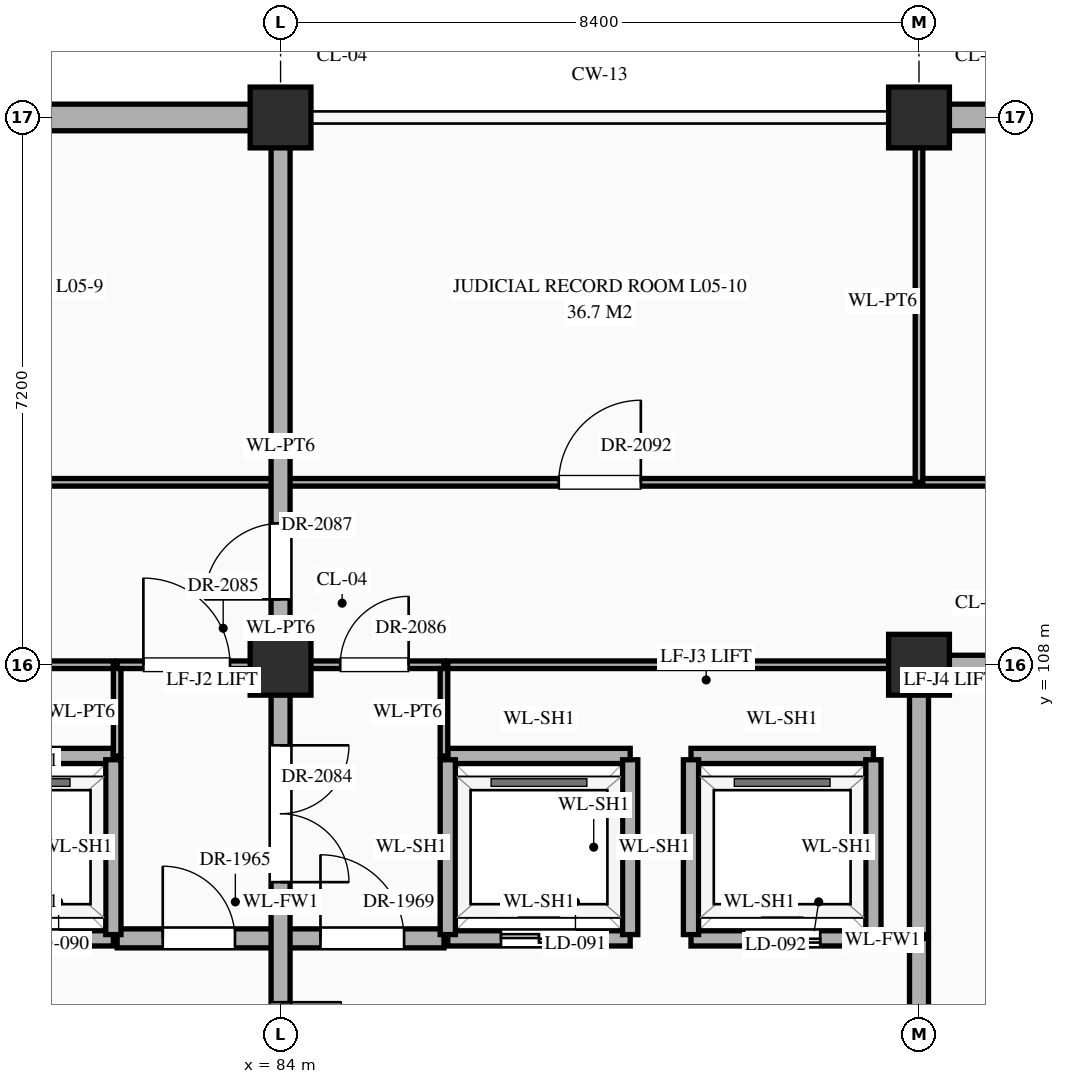
"""IFC4 building model, lengths in metres.
Left out: names, types, materials, properties, quantities, classifications, styles, units other than length and angle.
Written with IfcOpenShell. Run it as: python <this file> out.ifc"""

import sys

from ifc_helpers import new_model, si_unit, direction, frame, frame_2d, origin, origin_2d, place, context, subcontext, project, spatial, rectangle, extrude, element, fill, save


model = new_model("IFC4")
c1 = context("Model", 3, precision=1e-05, world=origin(), true_north=direction((0.0, 1.0)))
c2 = subcontext(c1, "Body", "Model", "MODEL_VIEW")
j1 = project(units=[si_unit("LENGTHUNIT", "METRE"), si_unit("PLANEANGLEUNIT", "RADIAN")], contexts=[c1])
p1 = place(None, origin())
s1 = spatial("IfcSite", under=j1, at=p1, CompositionType="ELEMENT")
p2 = place(p1, origin())
s2 = spatial("IfcBuilding", under=s1, at=p2, CompositionType="ELEMENT")
p3 = place(p2, frame((0.0, 0.0, 21.6)))
s3 = spatial("IfcBuildingStorey", under=s2, at=p3, CompositionType="ELEMENT", Elevation=21.6)
for number, where, z_axis, x_axis in (
    (1, (84.0, 108.0, 0.0), (0.0, 0.0, 1.0), (1.0, 0.0, 0.0)),
    (2, (84.0, 115.2, 0.0), (0.0, 0.0, 1.0), (1.0, 0.0, 0.0)),
    (3, (92.4, 108.0, 0.0), (0.0, 0.0, 1.0), (1.0, 0.0, 0.0)),
    (4, (92.4, 115.2, 0.0), (0.0, 0.0, 1.0), (1.0, 0.0, 0.0)),
):
    element("IfcColumn", number, at=place(p3, frame(where, z_axis=z_axis, x_axis=x_axis)), inside=s3, PredefinedType="COLUMN", context=c2, shape_type="SweptSolid", body=[
        extrude(rectangle(XDim=0.8, YDim=0.8, at=origin_2d()), origin(), (0.0, 0.0, 1.0), 4.5),
    ])
p4 = place(p3, frame((75.995, 115.2, 0.0), z_axis=(0.0, 0.0, 1.0), x_axis=(1.0, 0.0, 0.0)))
e5 = element("IfcWall", 5, at=p4, inside=s3, PredefinedType="STANDARD", context=c2, shape_type="SweptSolid", body=[
    extrude(rectangle(XDim=7.61, YDim=0.35, at=frame_2d((3.805, 0.0))), origin(), (0.0, 0.0, 1.0), 3.59),
])
p5 = place(p4, frame((3.355, 0.0, 0.85)))
e6 = element("IfcOpeningElement", 6, at=p5, cuts=e5, PredefinedType="OPENING", context=c2, shape_type="SweptSolid", body=[
    extrude(rectangle(XDim=0.9, YDim=2.12, at=frame_2d((0.45, 1.06))), frame((0.0, 0.187, 0.0), z_axis=(0.0, -1.0, 0.0), x_axis=(1.0, 0.0, 0.0)), (0.0, 0.0, 1.0), 0.374),
])
p6 = place(p3, frame((92.795, 115.2, 0.0), z_axis=(0.0, 0.0, 1.0), x_axis=(1.0, 0.0, 0.0)))
e7 = element("IfcWall", 7, at=p6, inside=s3, PredefinedType="STANDARD", context=c2, shape_type="SweptSolid", body=[
    extrude(rectangle(XDim=7.61, YDim=0.35, at=frame_2d((3.805, 0.0))), origin(), (0.0, 0.0, 1.0), 3.59),
])
p7 = place(p6, frame((3.28, 0.0, 0.85)))
e8 = element("IfcOpeningElement", 8, at=p7, cuts=e7, PredefinedType="OPENING", context=c2, shape_type="SweptSolid", body=[
    extrude(rectangle(XDim=1.05, YDim=1.38, at=frame_2d((0.525, 0.69))), frame((0.0, 0.187, 0.0), z_axis=(0.0, -1.0, 0.0), x_axis=(1.0, 0.0, 0.0)), (0.0, 0.0, 1.0), 0.374),
])
p8 = place(p3, frame((79.4, 104.4, 0.0), z_axis=(0.0, 0.0, 1.0), x_axis=(1.0, 0.0, 0.0)))
e9 = element("IfcWall", 9, at=p8, inside=s3, PredefinedType="STANDARD", context=c2, shape_type="SweptSolid", body=[
    extrude(rectangle(XDim=2.4, YDim=0.2, at=frame_2d((1.2, 0.0))), origin(), (0.0, 0.0, 1.0), 4.24),
])
p9 = place(p8, frame((0.7, 0.0, 0.0)))
e10 = element("IfcOpeningElement", 10, at=p9, cuts=e9, PredefinedType="OPENING", context=c2, shape_type="SweptSolid", body=[
    extrude(rectangle(XDim=1.0, YDim=2.15, at=frame_2d((0.5, 1.075))), frame((0.0, 0.112, 0.0), z_axis=(0.0, -1.0, 0.0), x_axis=(1.0, 0.0, 0.0)), (0.0, 0.0, 1.0), 0.224),
])
p10 = place(p3, frame((81.85, 104.4, 0.0), z_axis=(0.0, 0.0, 1.0), x_axis=(1.0, 0.0, 0.0)))
e11 = element("IfcWall", 11, at=p10, inside=s3, PredefinedType="STANDARD", context=c2, shape_type="SweptSolid", body=[
    extrude(rectangle(XDim=4.3, YDim=0.25, at=frame_2d((2.15, 0.0))), origin(), (0.0, 0.0, 1.0), 4.24),
])
p11 = place(p10, frame((0.6, 0.0, 0.0)))
e12 = element("IfcOpeningElement", 12, at=p11, cuts=e11, PredefinedType="OPENING", context=c2, shape_type="SweptSolid", body=[
    extrude(rectangle(XDim=0.95, YDim=2.15, at=frame_2d((0.475, 1.075))), frame((0.0, 0.137, 0.0), z_axis=(0.0, -1.0, 0.0), x_axis=(1.0, 0.0, 0.0)), (0.0, 0.0, 1.0), 0.274),
])
p12 = place(p10, frame((2.675, 0.0, 0.0)))
e13 = element("IfcOpeningElement", 13, at=p12, cuts=e11, PredefinedType="OPENING", context=c2, shape_type="SweptSolid", body=[
    extrude(rectangle(XDim=1.1, YDim=2.2, at=frame_2d((0.55, 1.1))), frame((0.0, 0.137, 0.0), z_axis=(0.0, -1.0, 0.0), x_axis=(1.0, 0.0, 0.0)), (0.0, 0.0, 1.0), 0.274),
])
p13 = place(p3, frame((86.2, 104.4, 0.0), z_axis=(0.0, 0.0, 1.0), x_axis=(1.0, 0.0, 0.0)))
e14 = element("IfcWall", 14, at=p13, inside=s3, PredefinedType="STANDARD", context=c2, shape_type="SweptSolid", body=[
    extrude(rectangle(XDim=2.4, YDim=0.2, at=frame_2d((1.2, 0.0))), origin(), (0.0, 0.0, 1.0), 4.24),
])
p14 = place(p13, frame((0.7, 0.0, 0.0)))
e15 = element("IfcOpeningElement", 15, at=p14, cuts=e14, PredefinedType="OPENING", context=c2, shape_type="SweptSolid", body=[
    extrude(rectangle(XDim=1.0, YDim=2.15, at=frame_2d((0.5, 1.075))), frame((0.0, 0.112, 0.0), z_axis=(0.0, -1.0, 0.0), x_axis=(1.0, 0.0, 0.0)), (0.0, 0.0, 1.0), 0.224),
])
p15 = place(p3, frame((89.4, 104.4, 0.0), z_axis=(0.0, 0.0, 1.0), x_axis=(1.0, 0.0, 0.0)))
e16 = element("IfcWall", 16, at=p15, inside=s3, PredefinedType="STANDARD", context=c2, shape_type="SweptSolid", body=[
    extrude(rectangle(XDim=2.4, YDim=0.2, at=frame_2d((1.2, 0.0))), origin(), (0.0, 0.0, 1.0), 4.24),
])
p16 = place(p15, frame((0.7, 0.0, 0.0)))
e17 = element("IfcOpeningElement", 17, at=p16, cuts=e16, PredefinedType="OPENING", context=c2, shape_type="SweptSolid", body=[
    extrude(rectangle(XDim=1.0, YDim=2.15, at=frame_2d((0.5, 1.075))), frame((0.0, 0.112, 0.0), z_axis=(0.0, -1.0, 0.0), x_axis=(1.0, 0.0, 0.0)), (0.0, 0.0, 1.0), 0.224),
])
for number, where, z_axis, x_axis in (
    (18, (79.4, 106.8, 0.0), (0.0, 0.0, 1.0), (1.0, 0.0, 0.0)),
    (19, (86.2, 106.8, 0.0), (0.0, 0.0, 1.0), (1.0, 0.0, 0.0)),
    (20, (89.4, 106.8, 0.0), (0.0, 0.0, 1.0), (1.0, 0.0, 0.0)),
):
    element("IfcWall", number, at=place(p3, frame(where, z_axis=z_axis, x_axis=x_axis)), inside=s3, PredefinedType="STANDARD", context=c2, shape_type="SweptSolid", body=[
        extrude(rectangle(XDim=2.4, YDim=0.2, at=frame_2d((1.2, 0.0))), origin(), (0.0, 0.0, 1.0), 4.24),
    ])
p17 = place(p3, frame((75.65, 108.0, 0.0), z_axis=(0.0, 0.0, 1.0), x_axis=(1.0, 0.0, 0.0)))
e21 = element("IfcWall", 21, at=p17, inside=s3, PredefinedType="STANDARD", context=c2, shape_type="SweptSolid", body=[
    extrude(rectangle(XDim=6.15, YDim=0.1, at=frame_2d((3.075, 0.0))), origin(), (0.0, 0.0, 1.0), 3.39),
])
p18 = place(p3, frame((81.85, 108.0, 0.0), z_axis=(0.0, 0.0, 1.0), x_axis=(1.0, 0.0, 0.0)))
e22 = element("IfcWall", 22, at=p18, inside=s3, PredefinedType="STANDARD", context=c2, shape_type="SweptSolid", body=[
    extrude(rectangle(XDim=4.3, YDim=0.1, at=frame_2d((2.15, 0.0))), origin(), (0.0, 0.0, 1.0), 3.39),
])
p19 = place(p18, frame((0.345, 0.0, 0.0)))
e23 = element("IfcOpeningElement", 23, at=p19, cuts=e22, PredefinedType="OPENING", context=c2, shape_type="SweptSolid", body=[
    extrude(rectangle(XDim=1.14, YDim=2.4, at=frame_2d((0.57, 1.2))), frame((0.0, 0.062, 0.0), z_axis=(0.0, -1.0, 0.0), x_axis=(1.0, 0.0, 0.0)), (0.0, 0.0, 1.0), 0.124),
])
p20 = place(p18, frame((2.935, 0.0, 0.0)))
e24 = element("IfcOpeningElement", 24, at=p20, cuts=e22, PredefinedType="OPENING", context=c2, shape_type="SweptSolid", body=[
    extrude(rectangle(XDim=0.9, YDim=2.15, at=frame_2d((0.45, 1.075))), frame((0.0, 0.062, 0.0), z_axis=(0.0, -1.0, 0.0), x_axis=(1.0, 0.0, 0.0)), (0.0, 0.0, 1.0), 0.124),
])
p21 = place(p3, frame((86.2, 108.0, 0.0), z_axis=(0.0, 0.0, 1.0), x_axis=(1.0, 0.0, 0.0)))
e25 = element("IfcWall", 25, at=p21, inside=s3, PredefinedType="STANDARD", context=c2, shape_type="SweptSolid", body=[
    extrude(rectangle(XDim=6.15, YDim=0.1, at=frame_2d((3.075, 0.0))), origin(), (0.0, 0.0, 1.0), 3.39),
])
p22 = place(p3, frame((92.4, 108.0, 0.0), z_axis=(0.0, 0.0, 1.0), x_axis=(1.0, 0.0, 0.0)))
e26 = element("IfcWall", 26, at=p22, inside=s3, PredefinedType="STANDARD", context=c2, shape_type="SweptSolid", body=[
    extrude(rectangle(XDim=4.2, YDim=0.25, at=frame_2d((2.1, 0.0))), origin(), (0.0, 0.0, 1.0), 3.39),
])
p23 = place(p22, frame((1.76, 0.0, 0.0)))
e27 = element("IfcOpeningElement", 27, at=p23, cuts=e26, PredefinedType="OPENING", context=c2, shape_type="SweptSolid", body=[
    extrude(rectangle(XDim=1.0, YDim=2.2, at=frame_2d((0.5, 1.1))), frame((0.0, 0.137, 0.0), z_axis=(0.0, -1.0, 0.0), x_axis=(1.0, 0.0, 0.0)), (0.0, 0.0, 1.0), 0.274),
])
p24 = place(p3, frame((67.2, 110.4, 0.0), z_axis=(0.0, 0.0, 1.0), x_axis=(1.0, 0.0, 0.0)))
e28 = element("IfcWall", 28, at=p24, inside=s3, PredefinedType="STANDARD", context=c2, shape_type="SweptSolid", body=[
    extrude(rectangle(XDim=33.6, YDim=0.1, at=frame_2d((16.8, 0.0))), origin(), (0.0, 0.0, 1.0), 4.24),
])
p25 = place(p24, frame((3.7, 0.0, 0.0)))
e29 = element("IfcOpeningElement", 29, at=p25, cuts=e28, PredefinedType="OPENING", context=c2, shape_type="SweptSolid", body=[
    extrude(rectangle(XDim=1.0, YDim=2.25, at=frame_2d((0.5, 1.125))), frame((0.0, 0.062, 0.0), z_axis=(0.0, -1.0, 0.0), x_axis=(1.0, 0.0, 0.0)), (0.0, 0.0, 1.0), 0.124),
])
p26 = place(p24, frame((12.08, 0.0, 0.0)))
e30 = element("IfcOpeningElement", 30, at=p26, cuts=e28, PredefinedType="OPENING", context=c2, shape_type="SweptSolid", body=[
    extrude(rectangle(XDim=1.04, YDim=2.2, at=frame_2d((0.52, 1.1))), frame((0.0, 0.062, 0.0), z_axis=(0.0, -1.0, 0.0), x_axis=(1.0, 0.0, 0.0)), (0.0, 0.0, 1.0), 0.124),
])
p27 = place(p24, frame((20.46, 0.0, 0.0)))
e31 = element("IfcOpeningElement", 31, at=p27, cuts=e28, PredefinedType="OPENING", context=c2, shape_type="SweptSolid", body=[
    extrude(rectangle(XDim=1.08, YDim=2.25, at=frame_2d((0.54, 1.125))), frame((0.0, 0.062, 0.0), z_axis=(0.0, -1.0, 0.0), x_axis=(1.0, 0.0, 0.0)), (0.0, 0.0, 1.0), 0.124),
])
p28 = place(p24, frame((28.84, 0.0, 0.0)))
e32 = element("IfcOpeningElement", 32, at=p28, cuts=e28, PredefinedType="OPENING", context=c2, shape_type="SweptSolid", body=[
    extrude(rectangle(XDim=1.12, YDim=2.25, at=frame_2d((0.56, 1.125))), frame((0.0, 0.062, 0.0), z_axis=(0.0, -1.0, 0.0), x_axis=(1.0, 0.0, 0.0)), (0.0, 0.0, 1.0), 0.124),
])
p29 = place(p3, frame((81.8, 104.45, 0.0), z_axis=(0.0, 0.0, 1.0), x_axis=(0.0, 1.0, 0.0)))
e33 = element("IfcWall", 33, at=p29, inside=s3, PredefinedType="STANDARD", context=c2, shape_type="SweptSolid", body=[
    extrude(rectangle(XDim=2.3, YDim=0.2, at=frame_2d((1.15, 0.0))), origin(), (0.0, 0.0, 1.0), 4.24),
])
p30 = place(p3, frame((81.85, 106.8, 0.0), z_axis=(0.0, 0.0, 1.0), x_axis=(0.0, 1.0, 0.0)))
e34 = element("IfcWall", 34, at=p30, inside=s3, PredefinedType="STANDARD", context=c2, shape_type="SweptSolid", body=[
    extrude(rectangle(XDim=1.15, YDim=0.1, at=frame_2d((0.575, 0.0))), origin(), (0.0, 0.0, 1.0), 4.24),
])
p31 = place(p3, frame((84.0, 79.24, 0.0), z_axis=(0.0, 0.0, 1.0), x_axis=(0.0, 1.0, 0.0)))
e35 = element("IfcWall", 35, at=p31, inside=s3, PredefinedType="STANDARD", context=c2, shape_type="SweptSolid", body=[
    extrude(rectangle(XDim=35.92, YDim=0.25, at=frame_2d((17.96, 0.0))), origin(), (0.0, 0.0, 1.0), 3.49),
])
p32 = place(p31, frame((22.72, 0.0, 0.0)))
e36 = element("IfcOpeningElement", 36, at=p32, cuts=e35, PredefinedType="OPENING", context=c2, shape_type="SweptSolid", body=[
    extrude(rectangle(XDim=1.6, YDim=2.3, at=frame_2d((0.8, 1.15))), frame((0.0, 0.137, 0.0), z_axis=(0.0, -1.0, 0.0), x_axis=(1.0, 0.0, 0.0)), (0.0, 0.0, 1.0), 0.274),
])
p33 = place(p31, frame((12.45, 0.0, 0.0)))
e37 = element("IfcOpeningElement", 37, at=p33, cuts=e35, PredefinedType="OPENING", context=c2, shape_type="SweptSolid", body=[
    extrude(rectangle(XDim=1.1, YDim=2.2, at=frame_2d((0.55, 1.1))), frame((0.0, 0.137, 0.0), z_axis=(0.0, -1.0, 0.0), x_axis=(1.0, 0.0, 0.0)), (0.0, 0.0, 1.0), 0.274),
])
p34 = place(p31, frame((15.245, 0.0, 0.0)))
e38 = element("IfcOpeningElement", 38, at=p34, cuts=e35, PredefinedType="OPENING", context=c2, shape_type="SweptSolid", body=[
    extrude(rectangle(XDim=0.95, YDim=2.15, at=frame_2d((0.475, 1.075))), frame((0.0, 0.137, 0.0), z_axis=(0.0, -1.0, 0.0), x_axis=(1.0, 0.0, 0.0)), (0.0, 0.0, 1.0), 0.274),
])
p35 = place(p31, frame((25.9, 0.0, 0.0)))
e39 = element("IfcOpeningElement", 39, at=p35, cuts=e35, PredefinedType="OPENING", context=c2, shape_type="SweptSolid", body=[
    extrude(rectangle(XDim=1.8, YDim=2.35, at=frame_2d((0.9, 1.175))), frame((0.0, 0.137, 0.0), z_axis=(0.0, -1.0, 0.0), x_axis=(1.0, 0.0, 0.0)), (0.0, 0.0, 1.0), 0.274),
])
p36 = place(p31, frame((29.62, 0.0, 0.0)))
e40 = element("IfcOpeningElement", 40, at=p36, cuts=e35, PredefinedType="OPENING", context=c2, shape_type="SweptSolid", body=[
    extrude(rectangle(XDim=1.0, YDim=2.2, at=frame_2d((0.5, 1.1))), frame((0.0, 0.137, 0.0), z_axis=(0.0, -1.0, 0.0), x_axis=(1.0, 0.0, 0.0)), (0.0, 0.0, 1.0), 0.274),
])
p37 = place(p31, frame((5.3, 0.0, 0.0)))
e41 = element("IfcOpeningElement", 41, at=p37, cuts=e35, PredefinedType="OPENING", context=c2, shape_type="SweptSolid", body=[
    extrude(rectangle(XDim=1.0, YDim=2.2, at=frame_2d((0.5, 1.1))), frame((0.0, 0.137, 0.0), z_axis=(0.0, -1.0, 0.0), x_axis=(1.0, 0.0, 0.0)), (0.0, 0.0, 1.0), 0.274),
])
p38 = place(p3, frame((86.15, 106.8, 0.0), z_axis=(0.0, 0.0, 1.0), x_axis=(0.0, 1.0, 0.0)))
e42 = element("IfcWall", 42, at=p38, inside=s3, PredefinedType="STANDARD", context=c2, shape_type="SweptSolid", body=[
    extrude(rectangle(XDim=1.15, YDim=0.1, at=frame_2d((0.575, 0.0))), origin(), (0.0, 0.0, 1.0), 4.24),
])
for number, where, z_axis, x_axis in (
    (43, (86.2, 104.45, 0.0), (0.0, 0.0, 1.0), (0.0, 1.0, 0.0)),
    (44, (88.6, 104.45, 0.0), (0.0, 0.0, 1.0), (0.0, 1.0, 0.0)),
    (45, (89.4, 104.45, 0.0), (0.0, 0.0, 1.0), (0.0, 1.0, 0.0)),
    (46, (91.8, 104.45, 0.0), (0.0, 0.0, 1.0), (0.0, 1.0, 0.0)),
):
    element("IfcWall", number, at=place(p3, frame(where, z_axis=z_axis, x_axis=x_axis)), inside=s3, PredefinedType="STANDARD", context=c2, shape_type="SweptSolid", body=[
        extrude(rectangle(XDim=2.3, YDim=0.2, at=frame_2d((1.15, 0.0))), origin(), (0.0, 0.0, 1.0), 4.24),
    ])
p39 = place(p3, frame((92.4, 100.8, 0.0), z_axis=(0.0, 0.0, 1.0), x_axis=(0.0, 1.0, 0.0)))
e47 = element("IfcWall", 47, at=p39, inside=s3, PredefinedType="STANDARD", context=c2, shape_type="SweptSolid", body=[
    extrude(rectangle(XDim=3.6, YDim=0.25, at=frame_2d((1.8, 0.0))), origin(), (0.0, 0.0, 1.0), 3.49),
])
p40 = place(p39, frame((0.885, 0.0, 0.0)))
e48 = element("IfcOpeningElement", 48, at=p40, cuts=e47, PredefinedType="OPENING", context=c2, shape_type="SweptSolid", body=[
    extrude(rectangle(XDim=0.95, YDim=2.15, at=frame_2d((0.475, 1.075))), frame((0.0, 0.137, 0.0), z_axis=(0.0, -1.0, 0.0), x_axis=(1.0, 0.0, 0.0)), (0.0, 0.0, 1.0), 0.274),
])
p41 = place(p3, frame((92.4, 104.45, 0.0), z_axis=(0.0, 0.0, 1.0), x_axis=(0.0, 1.0, 0.0)))
e49 = element("IfcWall", 49, at=p41, inside=s3, PredefinedType="STANDARD", context=c2, shape_type="SweptSolid", body=[
    extrude(rectangle(XDim=3.5, YDim=0.25, at=frame_2d((1.75, 0.0))), origin(), (0.0, 0.0, 1.0), 3.49),
])
p42 = place(p3, frame((92.4, 110.4, 0.0), z_axis=(0.0, 0.0, 1.0), x_axis=(0.0, 1.0, 0.0)))
e50 = element("IfcWall", 50, at=p42, inside=s3, PredefinedType="STANDARD", context=c2, shape_type="SweptSolid", body=[
    extrude(rectangle(XDim=4.76, YDim=0.1, at=frame_2d((2.38, 0.0))), origin(), (0.0, 0.0, 1.0), 3.49),
])
p43 = place(p9, origin())
e51 = element("IfcDoor", 51, at=p43, inside=s3, OperationType="DOUBLE_DOOR_SLIDING", PredefinedType="DOOR", context=c2, shape_type="SweptSolid", body=[
    extrude(rectangle(XDim=1.0, YDim=2.15, at=frame_2d((0.5, 1.075))), frame((0.0, 0.025, 0.0), z_axis=(0.0, -1.0, 0.0), x_axis=(1.0, 0.0, 0.0)), (0.0, 0.0, 1.0), 0.05),
])
fill(e10, e51)
p44 = place(p14, origin())
e52 = element("IfcDoor", 52, at=p44, inside=s3, OperationType="DOUBLE_DOOR_SLIDING", PredefinedType="DOOR", context=c2, shape_type="SweptSolid", body=[
    extrude(rectangle(XDim=1.0, YDim=2.15, at=frame_2d((0.5, 1.075))), frame((0.0, 0.025, 0.0), z_axis=(0.0, -1.0, 0.0), x_axis=(1.0, 0.0, 0.0)), (0.0, 0.0, 1.0), 0.05),
])
fill(e15, e52)
p45 = place(p16, origin())
e53 = element("IfcDoor", 53, at=p45, inside=s3, OperationType="DOUBLE_DOOR_SLIDING", PredefinedType="DOOR", context=c2, shape_type="SweptSolid", body=[
    extrude(rectangle(XDim=1.0, YDim=2.15, at=frame_2d((0.5, 1.075))), frame((0.0, 0.025, 0.0), z_axis=(0.0, -1.0, 0.0), x_axis=(1.0, 0.0, 0.0)), (0.0, 0.0, 1.0), 0.05),
])
fill(e17, e53)
p46 = place(p32, frame((1.6, 0.0, 0.0), z_axis=(0.0, 0.0, 1.0), x_axis=(-1.0, 0.0, 0.0)))
e54 = element("IfcDoor", 54, at=p46, inside=s3, OperationType="DOUBLE_DOOR_SINGLE_SWING", PredefinedType="DOOR", context=c2, shape_type="SweptSolid", body=[
    extrude(rectangle(XDim=1.6, YDim=2.3, at=frame_2d((0.8, 1.15))), frame((0.0, 0.025, 0.0), z_axis=(0.0, -1.0, 0.0), x_axis=(1.0, 0.0, 0.0)), (0.0, 0.0, 1.0), 0.05),
])
fill(e36, e54)
p47 = place(p11, origin())
e55 = element("IfcDoor", 55, at=p47, inside=s3, OperationType="SINGLE_SWING_LEFT", PredefinedType="DOOR", context=c2, shape_type="SweptSolid", body=[
    extrude(rectangle(XDim=0.95, YDim=2.15, at=frame_2d((0.475, 1.075))), frame((0.0, 0.025, 0.0), z_axis=(0.0, -1.0, 0.0), x_axis=(1.0, 0.0, 0.0)), (0.0, 0.0, 1.0), 0.05),
])
fill(e12, e55)
p48 = place(p12, origin())
e56 = element("IfcDoor", 56, at=p48, inside=s3, OperationType="SINGLE_SWING_LEFT", PredefinedType="DOOR", context=c2, shape_type="SweptSolid", body=[
    extrude(rectangle(XDim=1.1, YDim=2.2, at=frame_2d((0.55, 1.1))), frame((0.0, 0.025, 0.0), z_axis=(0.0, -1.0, 0.0), x_axis=(1.0, 0.0, 0.0)), (0.0, 0.0, 1.0), 0.05),
])
fill(e13, e56)
p49 = place(p35, frame((1.8, 0.0, 0.0), z_axis=(0.0, 0.0, 1.0), x_axis=(-1.0, 0.0, 0.0)))
e57 = element("IfcDoor", 57, at=p49, inside=s3, OperationType="DOUBLE_DOOR_SINGLE_SWING", PredefinedType="DOOR", context=c2, shape_type="SweptSolid", body=[
    extrude(rectangle(XDim=1.8, YDim=2.35, at=frame_2d((0.9, 1.175))), frame((0.0, 0.025, 0.0), z_axis=(0.0, -1.0, 0.0), x_axis=(1.0, 0.0, 0.0)), (0.0, 0.0, 1.0), 0.05),
])
fill(e39, e57)
p50 = place(p19, origin())
e58 = element("IfcDoor", 58, at=p50, inside=s3, OperationType="SINGLE_SWING_LEFT", PredefinedType="DOOR", context=c2, shape_type="SweptSolid", body=[
    extrude(rectangle(XDim=1.14, YDim=2.4, at=frame_2d((0.57, 1.2))), frame((0.0, 0.025, 0.0), z_axis=(0.0, -1.0, 0.0), x_axis=(1.0, 0.0, 0.0)), (0.0, 0.0, 1.0), 0.05),
])
fill(e23, e58)
p51 = place(p20, origin())
e59 = element("IfcDoor", 59, at=p51, inside=s3, OperationType="SINGLE_SWING_RIGHT", PredefinedType="DOOR", context=c2, shape_type="SweptSolid", body=[
    extrude(rectangle(XDim=0.9, YDim=2.15, at=frame_2d((0.45, 1.075))), frame((0.0, 0.025, 0.0), z_axis=(0.0, -1.0, 0.0), x_axis=(1.0, 0.0, 0.0)), (0.0, 0.0, 1.0), 0.05),
])
fill(e24, e59)
p52 = place(p36, origin())
e60 = element("IfcDoor", 60, at=p52, inside=s3, OperationType="SINGLE_SWING_LEFT", PredefinedType="DOOR", context=c2, shape_type="SweptSolid", body=[
    extrude(rectangle(XDim=1.0, YDim=2.2, at=frame_2d((0.5, 1.1))), frame((0.0, 0.025, 0.0), z_axis=(0.0, -1.0, 0.0), x_axis=(1.0, 0.0, 0.0)), (0.0, 0.0, 1.0), 0.05),
])
fill(e40, e60)
p53 = place(p27, origin())
e61 = element("IfcDoor", 61, at=p53, inside=s3, OperationType="SINGLE_SWING_RIGHT", PredefinedType="DOOR", context=c2, shape_type="SweptSolid", body=[
    extrude(rectangle(XDim=1.08, YDim=2.25, at=frame_2d((0.54, 1.125))), frame((0.0, 0.025, 0.0), z_axis=(0.0, -1.0, 0.0), x_axis=(1.0, 0.0, 0.0)), (0.0, 0.0, 1.0), 0.05),
])
fill(e31, e61)
save(model, sys.argv[1])
